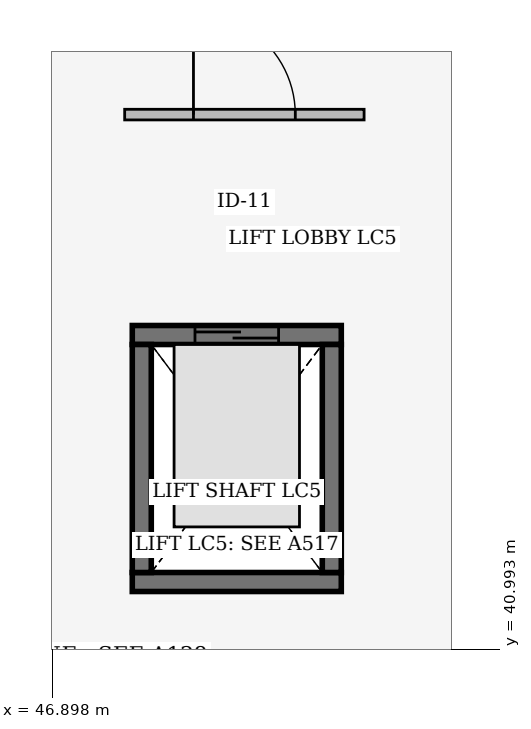
"""IFC4 building model, lengths in metres.
Left out: names, types, materials, properties, quantities, classifications, styles, units other than length and angle.
Written with IfcOpenShell. Run it as: python <this file> out.ifc"""

import sys

from ifc_helpers import new_model, si_unit, direction, frame, frame_2d, origin, place, context, subcontext, project, spatial, rectangle, extrude, element, fill, save


model = new_model("IFC4")
c1 = context("Model", 3, precision=1e-05, world=origin(), true_north=direction((0.0, 1.0)))
c2 = subcontext(c1, "Body", "Model", "MODEL_VIEW")
j1 = project(units=[si_unit("LENGTHUNIT", "METRE"), si_unit("PLANEANGLEUNIT", "RADIAN")], contexts=[c1])
p1 = place(None, origin())
s1 = spatial("IfcSite", under=j1, at=p1, CompositionType="ELEMENT")
p2 = place(p1, origin())
s2 = spatial("IfcBuilding", under=s1, at=p2, CompositionType="ELEMENT")
p3 = place(p2, frame((0.0, 0.0, 5.4)))
s3 = spatial("IfcBuildingStorey", under=s2, at=p3, CompositionType="ELEMENT", Elevation=5.4)
p4 = place(p3, frame((47.95, 41.875, 0.0), z_axis=(0.0, 0.0, 1.0), x_axis=(1.0, 0.0, 0.0)))
e1 = element("IfcWall", 1, at=p4, inside=s3, PredefinedType="SHEAR", context=c2, shape_type="SweptSolid", body=[
    extrude(rectangle(XDim=2.75, YDim=0.25, at=frame_2d((1.375, 0.0))), origin(), (0.0, 0.0, 1.0), 4.8),
])
p5 = place(p3, frame((47.95, 45.125, 0.0), z_axis=(0.0, 0.0, 1.0), x_axis=(1.0, 0.0, 0.0)))
e2 = element("IfcWall", 2, at=p5, inside=s3, PredefinedType="SHEAR", context=c2, shape_type="SweptSolid", body=[
    extrude(rectangle(XDim=2.75, YDim=0.25, at=frame_2d((1.375, 0.0))), origin(), (0.0, 0.0, 1.0), 4.8),
])
p6 = place(p5, frame((0.825, 0.0, 0.0)))
e3 = element("IfcOpeningElement", 3, at=p6, cuts=e2, PredefinedType="OPENING", context=c2, shape_type="SweptSolid", body=[
    extrude(rectangle(XDim=1.1, YDim=2.2, at=frame_2d((0.55, 1.1))), frame((0.0, 0.135, 0.0), z_axis=(0.0, -1.0, 0.0), x_axis=(1.0, 0.0, 0.0)), (0.0, 0.0, 1.0), 0.27),
])
for number, where, z_axis, x_axis in (
    (4, (48.075, 42.0, 0.0), (0.0, 0.0, 1.0), (0.0, 1.0, 0.0)),
    (5, (50.575, 42.0, 0.0), (0.0, 0.0, 1.0), (0.0, 1.0, 0.0)),
):
    element("IfcWall", number, at=place(p3, frame(where, z_axis=z_axis, x_axis=x_axis)), inside=s3, PredefinedType="SHEAR", context=c2, shape_type="SweptSolid", body=[
        extrude(rectangle(XDim=3.0, YDim=0.25, at=frame_2d((1.5, 0.0))), origin(), (0.0, 0.0, 1.0), 4.8),
    ])
p7 = place(p3, frame((47.85, 48.025, 0.0), z_axis=(0.0, 0.0, 1.0), x_axis=(1.0, 0.0, 0.0)))
e6 = element("IfcWall", 6, at=p7, inside=s3, PredefinedType="PARTITIONING", context=c2, shape_type="SweptSolid", body=[
    extrude(rectangle(XDim=3.15, YDim=0.14, at=frame_2d((1.575, 0.0))), origin(), (0.0, 0.0, 1.0), 4.456),
])
p8 = place(p7, frame((0.905, 0.0, 0.0)))
e7 = element("IfcOpeningElement", 7, at=p8, cuts=e6, PredefinedType="OPENING", context=c2, shape_type="SweptSolid", body=[
    extrude(rectangle(XDim=1.34, YDim=2.28, at=frame_2d((0.67, 1.14))), frame((0.0, 0.08, 0.0), z_axis=(0.0, -1.0, 0.0), x_axis=(1.0, 0.0, 0.0)), (0.0, 0.0, 1.0), 0.16),
])
p9 = place(p6, origin())
e8 = element("IfcDoor", 8, at=p9, inside=s3, OperationType="DOUBLE_DOOR_SLIDING", PredefinedType="DOOR", context=c2, shape_type="SweptSolid", body=[
    extrude(rectangle(XDim=1.1, YDim=2.2, at=frame_2d((0.55, 1.1))), frame((0.0, 0.025, 0.0), z_axis=(0.0, -1.0, 0.0), x_axis=(1.0, 0.0, 0.0)), (0.0, 0.0, 1.0), 0.05),
])
fill(e3, e8)
p10 = place(p8, origin())
e9 = element("IfcDoor", 9, at=p10, inside=s3, OperationType="SINGLE_SWING_LEFT", PredefinedType="DOOR", context=c2, shape_type="SweptSolid", body=[
    extrude(rectangle(XDim=1.34, YDim=2.28, at=frame_2d((0.67, 1.14))), frame((0.0, 0.025, 0.0), z_axis=(0.0, -1.0, 0.0), x_axis=(1.0, 0.0, 0.0)), (0.0, 0.0, 1.0), 0.05),
])
fill(e7, e9)
save(model, sys.argv[1])
